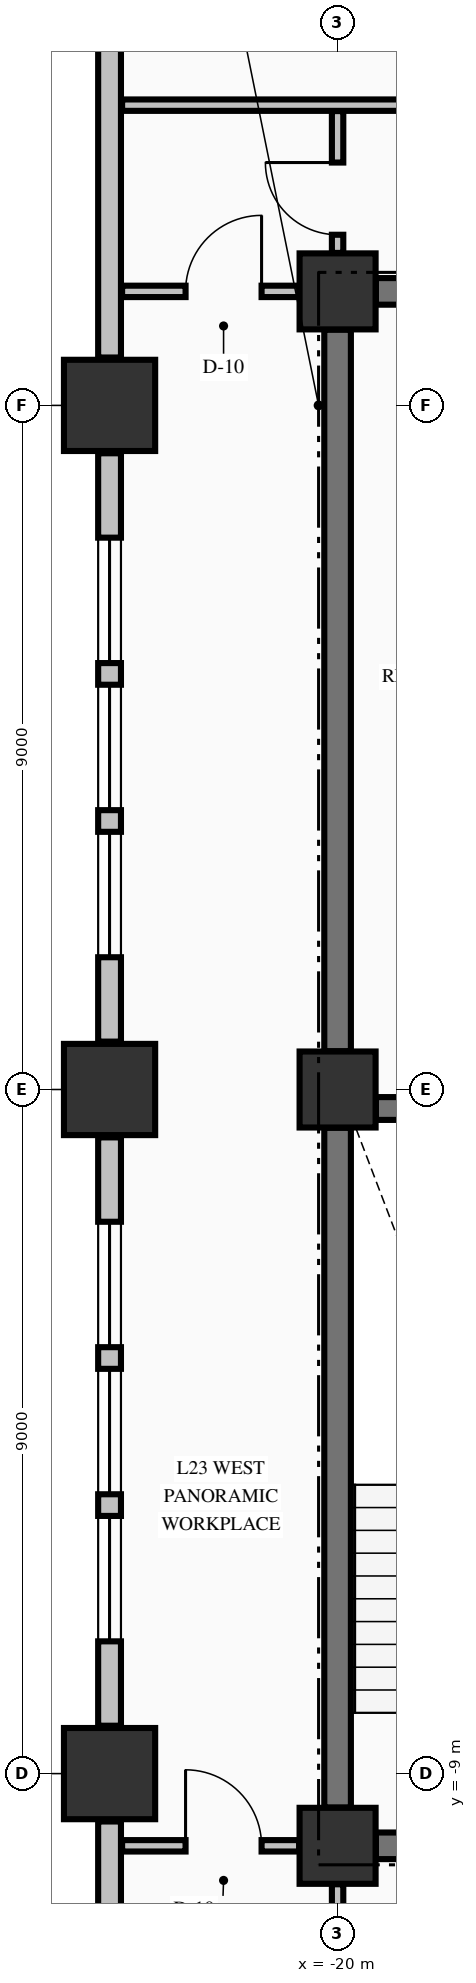
"""IFC4 building model, lengths in metres.
Left out: names, types, materials, properties, quantities, classifications, styles, units other than length and angle.
Written with IfcOpenShell. Run it as: python <this file> out.ifc"""

import sys

from ifc_helpers import new_model, si_unit, direction, frame, frame_2d, origin, origin_2d, place, context, subcontext, project, spatial, rectangle, extrude, element, fill, save


model = new_model("IFC4")
c1 = context("Model", 3, precision=1e-05, world=origin(), true_north=direction((0.0, 1.0)))
c2 = subcontext(c1, "Body", "Model", "MODEL_VIEW")
j1 = project(units=[si_unit("LENGTHUNIT", "METRE"), si_unit("PLANEANGLEUNIT", "RADIAN")], contexts=[c1])
p1 = place(None, origin())
s1 = spatial("IfcSite", under=j1, at=p1, CompositionType="ELEMENT")
p2 = place(p1, origin())
s2 = spatial("IfcBuilding", under=s1, at=p2, CompositionType="ELEMENT")
p3 = place(p2, frame((0.0, 0.0, 94.93)))
s3 = spatial("IfcBuildingStorey", under=s2, at=p3, CompositionType="ELEMENT", Elevation=94.93)
for number, where, z_axis, x_axis in (
    (1, (-23.0, -9.0, -0.25), (0.0, 0.0, 1.0), (1.0, 0.0, 0.0)),
    (2, (-23.0, 0.0, -0.25), (0.0, 0.0, 1.0), (1.0, 0.0, 0.0)),
    (3, (-23.0, 9.0, -0.25), (0.0, 0.0, 1.0), (1.0, 0.0, 0.0)),
):
    element("IfcColumn", number, at=place(p3, frame(where, z_axis=z_axis, x_axis=x_axis)), inside=s3, PredefinedType="COLUMN", context=c2, shape_type="SweptSolid", body=[
        extrude(rectangle(XDim=1.2, YDim=1.2, at=origin_2d()), origin(), (0.0, 0.0, 1.0), 3.545),
    ])
for number, where, z_axis, x_axis in (
    (4, (-20.0, -9.95, -0.25), (0.0, 0.0, 1.0), (1.0, 0.0, 0.0)),
    (5, (-20.0, 10.5, -0.25), (0.0, 0.0, 1.0), (1.0, 0.0, 0.0)),
    (6, (-20.0, 0.0, -0.25), (0.0, 0.0, 1.0), (1.0, 0.0, 0.0)),
):
    element("IfcColumn", number, at=place(p3, frame(where, z_axis=z_axis, x_axis=x_axis)), inside=s3, PredefinedType="COLUMN", context=c2, shape_type="SweptSolid", body=[
        extrude(rectangle(XDim=1.0, YDim=1.0, at=origin_2d()), origin(), (0.0, 0.0, 1.0), 3.545),
    ])
p4 = place(p3, frame((-23.0, -9.63, 0.0), z_axis=(0.0, 0.0, 1.0), x_axis=(0.0, -1.0, 0.0)))
e7 = element("IfcWall", 7, at=p4, inside=s3, PredefinedType="STANDARD", context=c2, shape_type="SweptSolid", body=[
    extrude(rectangle(XDim=10.74, YDim=0.3, at=frame_2d((5.37, 0.0))), origin(), (0.0, 0.0, 1.0), 2.687),
])
p5 = place(p3, frame((-23.0, -0.63, 0.0), z_axis=(0.0, 0.0, 1.0), x_axis=(0.0, -1.0, 0.0)))
e8 = element("IfcWall", 8, at=p5, inside=s3, PredefinedType="STANDARD", context=c2, shape_type="SweptSolid", body=[
    extrude(rectangle(XDim=7.74, YDim=0.3, at=frame_2d((3.87, 0.0))), origin(), (0.0, 0.0, 1.0), 2.687),
])
p6 = place(p5, frame((1.11, 0.0, 0.8)))
e9 = element("IfcOpeningElement", 9, at=p6, cuts=e8, PredefinedType="OPENING", context=c2, shape_type="SweptSolid", body=[
    extrude(rectangle(XDim=1.65, YDim=1.7, at=frame_2d((0.825, 0.85))), frame((0.0, 0.16, 0.0), z_axis=(0.0, -1.0, 0.0), x_axis=(1.0, 0.0, 0.0)), (0.0, 0.0, 1.0), 0.32),
])
p7 = place(p5, frame((3.045, 0.0, 0.8)))
e10 = element("IfcOpeningElement", 10, at=p7, cuts=e8, PredefinedType="OPENING", context=c2, shape_type="SweptSolid", body=[
    extrude(rectangle(XDim=1.65, YDim=1.7, at=frame_2d((0.825, 0.85))), frame((0.0, 0.16, 0.0), z_axis=(0.0, -1.0, 0.0), x_axis=(1.0, 0.0, 0.0)), (0.0, 0.0, 1.0), 0.32),
])
p8 = place(p5, frame((4.98, 0.0, 0.8)))
e11 = element("IfcOpeningElement", 11, at=p8, cuts=e8, PredefinedType="OPENING", context=c2, shape_type="SweptSolid", body=[
    extrude(rectangle(XDim=1.65, YDim=1.7, at=frame_2d((0.825, 0.85))), frame((0.0, 0.16, 0.0), z_axis=(0.0, -1.0, 0.0), x_axis=(1.0, 0.0, 0.0)), (0.0, 0.0, 1.0), 0.32),
])
p9 = place(p3, frame((-23.0, 8.37, 0.0), z_axis=(0.0, 0.0, 1.0), x_axis=(0.0, -1.0, 0.0)))
e12 = element("IfcWall", 12, at=p9, inside=s3, PredefinedType="STANDARD", context=c2, shape_type="SweptSolid", body=[
    extrude(rectangle(XDim=7.74, YDim=0.3, at=frame_2d((3.87, 0.0))), origin(), (0.0, 0.0, 1.0), 2.687),
])
p10 = place(p9, frame((1.11, 0.0, 0.8)))
e13 = element("IfcOpeningElement", 13, at=p10, cuts=e12, PredefinedType="OPENING", context=c2, shape_type="SweptSolid", body=[
    extrude(rectangle(XDim=1.65, YDim=1.7, at=frame_2d((0.825, 0.85))), frame((0.0, 0.16, 0.0), z_axis=(0.0, -1.0, 0.0), x_axis=(1.0, 0.0, 0.0)), (0.0, 0.0, 1.0), 0.32),
])
p11 = place(p9, frame((3.045, 0.0, 0.8)))
e14 = element("IfcOpeningElement", 14, at=p11, cuts=e12, PredefinedType="OPENING", context=c2, shape_type="SweptSolid", body=[
    extrude(rectangle(XDim=1.65, YDim=1.7, at=frame_2d((0.825, 0.85))), frame((0.0, 0.16, 0.0), z_axis=(0.0, -1.0, 0.0), x_axis=(1.0, 0.0, 0.0)), (0.0, 0.0, 1.0), 0.32),
])
p12 = place(p9, frame((4.98, 0.0, 0.8)))
e15 = element("IfcOpeningElement", 15, at=p12, cuts=e12, PredefinedType="OPENING", context=c2, shape_type="SweptSolid", body=[
    extrude(rectangle(XDim=1.65, YDim=1.7, at=frame_2d((0.825, 0.85))), frame((0.0, 0.16, 0.0), z_axis=(0.0, -1.0, 0.0), x_axis=(1.0, 0.0, 0.0)), (0.0, 0.0, 1.0), 0.32),
])
p13 = place(p3, frame((-23.0, 20.37, 0.0), z_axis=(0.0, 0.0, 1.0), x_axis=(0.0, -1.0, 0.0)))
e16 = element("IfcWall", 16, at=p13, inside=s3, PredefinedType="STANDARD", context=c2, shape_type="SweptSolid", body=[
    extrude(rectangle(XDim=10.74, YDim=0.3, at=frame_2d((5.37, 0.0))), origin(), (0.0, 0.0, 1.0), 2.687),
])
p14 = place(p3, frame((-19.496, -9.95, 0.0), z_axis=(0.0, 0.0, 1.0), x_axis=(1.0, 0.0, 0.0)))
e17 = element("IfcWall", 17, at=p14, inside=s3, PredefinedType="SHEAR", context=c2, shape_type="SweptSolid", body=[
    extrude(rectangle(XDim=4.796, YDim=0.35, at=frame_2d((2.398, 0.0))), origin(), (0.0, 0.0, 1.0), 3.295),
])
p15 = place(p14, frame((0.671, 0.0, 0.0)))
e18 = element("IfcOpeningElement", 18, at=p15, cuts=e17, PredefinedType="OPENING", context=c2, shape_type="SweptSolid", body=[
    extrude(rectangle(XDim=1.05, YDim=2.15, at=frame_2d((0.525, 1.075))), frame((0.0, 0.185, 0.0), z_axis=(0.0, -1.0, 0.0), x_axis=(1.0, 0.0, 0.0)), (0.0, 0.0, 1.0), 0.37),
])
p16 = place(p3, frame((-19.496, -0.25, 0.0), z_axis=(0.0, 0.0, 1.0), x_axis=(1.0, 0.0, 0.0)))
e19 = element("IfcWall", 19, at=p16, inside=s3, PredefinedType="SHEAR", context=c2, shape_type="SweptSolid", body=[
    extrude(rectangle(XDim=7.992, YDim=0.3, at=frame_2d((3.996, 0.0))), origin(), (0.0, 0.0, 1.0), 3.295),
])
p17 = place(p16, frame((5.796, 0.0, 0.0)))
e20 = element("IfcOpeningElement", 20, at=p17, cuts=e19, PredefinedType="OPENING", context=c2, shape_type="SweptSolid", body=[
    extrude(rectangle(XDim=1.1, YDim=2.15, at=frame_2d((0.55, 1.075))), frame((0.0, 0.16, 0.0), z_axis=(0.0, -1.0, 0.0), x_axis=(1.0, 0.0, 0.0)), (0.0, 0.0, 1.0), 0.32),
])
p18 = place(p3, frame((-19.496, 10.5, 0.0), z_axis=(0.0, 0.0, 1.0), x_axis=(1.0, 0.0, 0.0)))
e21 = element("IfcWall", 21, at=p18, inside=s3, PredefinedType="SHEAR", context=c2, shape_type="SweptSolid", body=[
    extrude(rectangle(XDim=4.796, YDim=0.35, at=frame_2d((2.398, 0.0))), origin(), (0.0, 0.0, 1.0), 3.295),
])
p19 = place(p18, frame((0.496, 0.0, 0.0)))
e22 = element("IfcOpeningElement", 22, at=p19, cuts=e21, PredefinedType="OPENING", context=c2, shape_type="SweptSolid", body=[
    extrude(rectangle(XDim=0.9, YDim=2.15, at=frame_2d((0.45, 1.075))), frame((0.0, 0.185, 0.0), z_axis=(0.0, -1.0, 0.0), x_axis=(1.0, 0.0, 0.0)), (0.0, 0.0, 1.0), 0.37),
])
p20 = place(p18, frame((3.046, 0.0, 0.0)))
e23 = element("IfcOpeningElement", 23, at=p20, cuts=e21, PredefinedType="OPENING", context=c2, shape_type="SweptSolid", body=[
    extrude(rectangle(XDim=0.9, YDim=2.15, at=frame_2d((0.45, 1.075))), frame((0.0, 0.185, 0.0), z_axis=(0.0, -1.0, 0.0), x_axis=(1.0, 0.0, 0.0)), (0.0, 0.0, 1.0), 0.37),
])
p21 = place(p3, frame((-22.835, -9.95, 0.0), z_axis=(0.0, 0.0, 1.0), x_axis=(1.0, 0.0, 0.0)))
e24 = element("IfcWall", 24, at=p21, inside=s3, PredefinedType="PARTITIONING", context=c2, shape_type="SweptSolid", body=[
    extrude(rectangle(XDim=2.329, YDim=0.15, at=frame_2d((1.165, 0.0))), origin(), (0.0, 0.0, 1.0), 3.295),
])
p22 = place(p21, frame((0.835, 0.0, 0.0)))
e25 = element("IfcOpeningElement", 25, at=p22, cuts=e24, PredefinedType="OPENING", context=c2, shape_type="SweptSolid", body=[
    extrude(rectangle(XDim=1.0, YDim=2.15, at=frame_2d((0.5, 1.075))), frame((0.0, 0.085, 0.0), z_axis=(0.0, -1.0, 0.0), x_axis=(1.0, 0.0, 0.0)), (0.0, 0.0, 1.0), 0.17),
])
p23 = place(p3, frame((-22.835, 10.5, 0.0), z_axis=(0.0, 0.0, 1.0), x_axis=(1.0, 0.0, 0.0)))
e26 = element("IfcWall", 26, at=p23, inside=s3, PredefinedType="PARTITIONING", context=c2, shape_type="SweptSolid", body=[
    extrude(rectangle(XDim=2.329, YDim=0.15, at=frame_2d((1.165, 0.0))), origin(), (0.0, 0.0, 1.0), 3.295),
])
p24 = place(p23, frame((0.835, 0.0, 0.0)))
e27 = element("IfcOpeningElement", 27, at=p24, cuts=e26, PredefinedType="OPENING", context=c2, shape_type="SweptSolid", body=[
    extrude(rectangle(XDim=1.0, YDim=2.15, at=frame_2d((0.5, 1.075))), frame((0.0, 0.085, 0.0), z_axis=(0.0, -1.0, 0.0), x_axis=(1.0, 0.0, 0.0)), (0.0, 0.0, 1.0), 0.17),
])
p25 = place(p3, frame((-22.835, 12.95, 0.0), z_axis=(0.0, 0.0, 1.0), x_axis=(1.0, 0.0, 0.0)))
e28 = element("IfcWall", 28, at=p25, inside=s3, PredefinedType="PARTITIONING", context=c2, shape_type="SweptSolid", body=[
    extrude(rectangle(XDim=50.67, YDim=0.15, at=frame_2d((25.335, 0.0))), origin(), (0.0, 0.0, 1.0), 3.295),
])
p26 = place(p25, frame((8.13, 0.0, 0.0)))
e29 = element("IfcOpeningElement", 29, at=p26, cuts=e28, PredefinedType="OPENING", context=c2, shape_type="SweptSolid", body=[
    extrude(rectangle(XDim=1.05, YDim=2.15, at=frame_2d((0.525, 1.075))), frame((0.0, 0.085, 0.0), z_axis=(0.0, -1.0, 0.0), x_axis=(1.0, 0.0, 0.0)), (0.0, 0.0, 1.0), 0.17),
])
p27 = place(p25, frame((15.41, 0.0, 0.0)))
e30 = element("IfcOpeningElement", 30, at=p27, cuts=e28, PredefinedType="OPENING", context=c2, shape_type="SweptSolid", body=[
    extrude(rectangle(XDim=0.95, YDim=2.15, at=frame_2d((0.475, 1.075))), frame((0.0, 0.085, 0.0), z_axis=(0.0, -1.0, 0.0), x_axis=(1.0, 0.0, 0.0)), (0.0, 0.0, 1.0), 0.17),
])
p28 = place(p25, frame((22.66, 0.0, 0.0)))
e31 = element("IfcOpeningElement", 31, at=p28, cuts=e28, PredefinedType="OPENING", context=c2, shape_type="SweptSolid", body=[
    extrude(rectangle(XDim=0.95, YDim=2.15, at=frame_2d((0.475, 1.075))), frame((0.0, 0.085, 0.0), z_axis=(0.0, -1.0, 0.0), x_axis=(1.0, 0.0, 0.0)), (0.0, 0.0, 1.0), 0.17),
])
p29 = place(p25, frame((27.41, 0.0, 0.0)))
e32 = element("IfcOpeningElement", 32, at=p29, cuts=e28, PredefinedType="OPENING", context=c2, shape_type="SweptSolid", body=[
    extrude(rectangle(XDim=0.95, YDim=2.15, at=frame_2d((0.475, 1.075))), frame((0.0, 0.085, 0.0), z_axis=(0.0, -1.0, 0.0), x_axis=(1.0, 0.0, 0.0)), (0.0, 0.0, 1.0), 0.17),
])
p30 = place(p25, frame((32.16, 0.0, 0.0)))
e33 = element("IfcOpeningElement", 33, at=p30, cuts=e28, PredefinedType="OPENING", context=c2, shape_type="SweptSolid", body=[
    extrude(rectangle(XDim=0.95, YDim=2.15, at=frame_2d((0.475, 1.075))), frame((0.0, 0.085, 0.0), z_axis=(0.0, -1.0, 0.0), x_axis=(1.0, 0.0, 0.0)), (0.0, 0.0, 1.0), 0.17),
])
p31 = place(p25, frame((39.29, 0.0, 0.0)))
e34 = element("IfcOpeningElement", 34, at=p31, cuts=e28, PredefinedType="OPENING", context=c2, shape_type="SweptSolid", body=[
    extrude(rectangle(XDim=1.05, YDim=2.15, at=frame_2d((0.525, 1.075))), frame((0.0, 0.085, 0.0), z_axis=(0.0, -1.0, 0.0), x_axis=(1.0, 0.0, 0.0)), (0.0, 0.0, 1.0), 0.17),
])
p32 = place(p3, frame((-20.0, -9.446, 0.0), z_axis=(0.0, 0.0, 1.0), x_axis=(0.0, 1.0, 0.0)))
e35 = element("IfcWall", 35, at=p32, inside=s3, PredefinedType="SHEAR", context=c2, shape_type="SweptSolid", body=[
    extrude(rectangle(XDim=8.942, YDim=0.35, at=frame_2d((4.471, 0.0))), origin(), (0.0, 0.0, 1.0), 3.295),
])
p33 = place(p3, frame((-20.0, 0.504, 0.0), z_axis=(0.0, 0.0, 1.0), x_axis=(0.0, 1.0, 0.0)))
e36 = element("IfcWall", 36, at=p33, inside=s3, PredefinedType="SHEAR", context=c2, shape_type="SweptSolid", body=[
    extrude(rectangle(XDim=9.492, YDim=0.35, at=frame_2d((4.746, 0.0))), origin(), (0.0, 0.0, 1.0), 3.295),
])
p34 = place(p3, frame((-20.0, -13.022, 0.0), z_axis=(0.0, 0.0, 1.0), x_axis=(0.0, 1.0, 0.0)))
e37 = element("IfcWall", 37, at=p34, inside=s3, PredefinedType="PARTITIONING", context=c2, shape_type="SweptSolid", body=[
    extrude(rectangle(XDim=2.566, YDim=0.15, at=frame_2d((1.283, 0.0))), origin(), (0.0, 0.0, 1.0), 2.785),
])
p35 = place(p34, frame((1.027, 0.0, 0.0)))
e38 = element("IfcOpeningElement", 38, at=p35, cuts=e37, PredefinedType="OPENING", context=c2, shape_type="SweptSolid", body=[
    extrude(rectangle(XDim=0.95, YDim=2.15, at=frame_2d((0.475, 1.075))), frame((0.0, 0.085, 0.0), z_axis=(0.0, -1.0, 0.0), x_axis=(1.0, 0.0, 0.0)), (0.0, 0.0, 1.0), 0.17),
])
p36 = place(p3, frame((-20.0, 11.006, 0.0), z_axis=(0.0, 0.0, 1.0), x_axis=(0.0, 1.0, 0.0)))
e39 = element("IfcWall", 39, at=p36, inside=s3, PredefinedType="PARTITIONING", context=c2, shape_type="SweptSolid", body=[
    extrude(rectangle(XDim=1.866, YDim=0.15, at=frame_2d((0.933, 0.0))), origin(), (0.0, 0.0, 1.0), 2.785),
])
p37 = place(p36, frame((0.239, 0.0, 0.0)))
e40 = element("IfcOpeningElement", 40, at=p37, cuts=e39, PredefinedType="OPENING", context=c2, shape_type="SweptSolid", body=[
    extrude(rectangle(XDim=0.95, YDim=2.15, at=frame_2d((0.475, 1.075))), frame((0.0, 0.085, 0.0), z_axis=(0.0, -1.0, 0.0), x_axis=(1.0, 0.0, 0.0)), (0.0, 0.0, 1.0), 0.17),
])
p38 = place(p6, origin())
e41 = element("IfcWindow", 41, at=p38, inside=s3, PartitioningType="SINGLE_PANEL", PredefinedType="WINDOW", context=c2, shape_type="SweptSolid", body=[
    extrude(rectangle(XDim=1.65, YDim=1.7, at=frame_2d((0.825, 0.85))), frame((0.0, 0.03, 0.0), z_axis=(0.0, -1.0, 0.0), x_axis=(1.0, 0.0, 0.0)), (0.0, 0.0, 1.0), 0.06),
])
fill(e9, e41)
p39 = place(p7, origin())
e42 = element("IfcWindow", 42, at=p39, inside=s3, PartitioningType="SINGLE_PANEL", PredefinedType="WINDOW", context=c2, shape_type="SweptSolid", body=[
    extrude(rectangle(XDim=1.65, YDim=1.7, at=frame_2d((0.825, 0.85))), frame((0.0, 0.03, 0.0), z_axis=(0.0, -1.0, 0.0), x_axis=(1.0, 0.0, 0.0)), (0.0, 0.0, 1.0), 0.06),
])
fill(e10, e42)
p40 = place(p8, origin())
e43 = element("IfcWindow", 43, at=p40, inside=s3, PartitioningType="SINGLE_PANEL", PredefinedType="WINDOW", context=c2, shape_type="SweptSolid", body=[
    extrude(rectangle(XDim=1.65, YDim=1.7, at=frame_2d((0.825, 0.85))), frame((0.0, 0.03, 0.0), z_axis=(0.0, -1.0, 0.0), x_axis=(1.0, 0.0, 0.0)), (0.0, 0.0, 1.0), 0.06),
])
fill(e11, e43)
p41 = place(p10, origin())
e44 = element("IfcWindow", 44, at=p41, inside=s3, PartitioningType="SINGLE_PANEL", PredefinedType="WINDOW", context=c2, shape_type="SweptSolid", body=[
    extrude(rectangle(XDim=1.65, YDim=1.7, at=frame_2d((0.825, 0.85))), frame((0.0, 0.03, 0.0), z_axis=(0.0, -1.0, 0.0), x_axis=(1.0, 0.0, 0.0)), (0.0, 0.0, 1.0), 0.06),
])
fill(e13, e44)
p42 = place(p11, origin())
e45 = element("IfcWindow", 45, at=p42, inside=s3, PartitioningType="SINGLE_PANEL", PredefinedType="WINDOW", context=c2, shape_type="SweptSolid", body=[
    extrude(rectangle(XDim=1.65, YDim=1.7, at=frame_2d((0.825, 0.85))), frame((0.0, 0.03, 0.0), z_axis=(0.0, -1.0, 0.0), x_axis=(1.0, 0.0, 0.0)), (0.0, 0.0, 1.0), 0.06),
])
fill(e14, e45)
p43 = place(p12, origin())
e46 = element("IfcWindow", 46, at=p43, inside=s3, PartitioningType="SINGLE_PANEL", PredefinedType="WINDOW", context=c2, shape_type="SweptSolid", body=[
    extrude(rectangle(XDim=1.65, YDim=1.7, at=frame_2d((0.825, 0.85))), frame((0.0, 0.03, 0.0), z_axis=(0.0, -1.0, 0.0), x_axis=(1.0, 0.0, 0.0)), (0.0, 0.0, 1.0), 0.06),
])
fill(e15, e46)
p44 = place(p37, origin())
e47 = element("IfcDoor", 47, at=p44, inside=s3, OperationType="SINGLE_SWING_RIGHT", PredefinedType="DOOR", context=c2, shape_type="SweptSolid", body=[
    extrude(rectangle(XDim=0.95, YDim=2.15, at=frame_2d((0.475, 1.075))), frame((0.0, 0.025, 0.0), z_axis=(0.0, -1.0, 0.0), x_axis=(1.0, 0.0, 0.0)), (0.0, 0.0, 1.0), 0.05),
])
fill(e40, e47)
p45 = place(p24, origin())
e48 = element("IfcDoor", 48, at=p45, inside=s3, OperationType="SINGLE_SWING_RIGHT", PredefinedType="DOOR", context=c2, shape_type="SweptSolid", body=[
    extrude(rectangle(XDim=1.0, YDim=2.15, at=frame_2d((0.5, 1.075))), frame((0.0, 0.025, 0.0), z_axis=(0.0, -1.0, 0.0), x_axis=(1.0, 0.0, 0.0)), (0.0, 0.0, 1.0), 0.05),
])
fill(e27, e48)
p46 = place(p22, origin())
e49 = element("IfcDoor", 49, at=p46, inside=s3, OperationType="SINGLE_SWING_LEFT", PredefinedType="DOOR", context=c2, shape_type="SweptSolid", body=[
    extrude(rectangle(XDim=1.0, YDim=2.15, at=frame_2d((0.5, 1.075))), frame((0.0, 0.025, 0.0), z_axis=(0.0, -1.0, 0.0), x_axis=(1.0, 0.0, 0.0)), (0.0, 0.0, 1.0), 0.05),
])
fill(e25, e49)
save(model, sys.argv[1])
